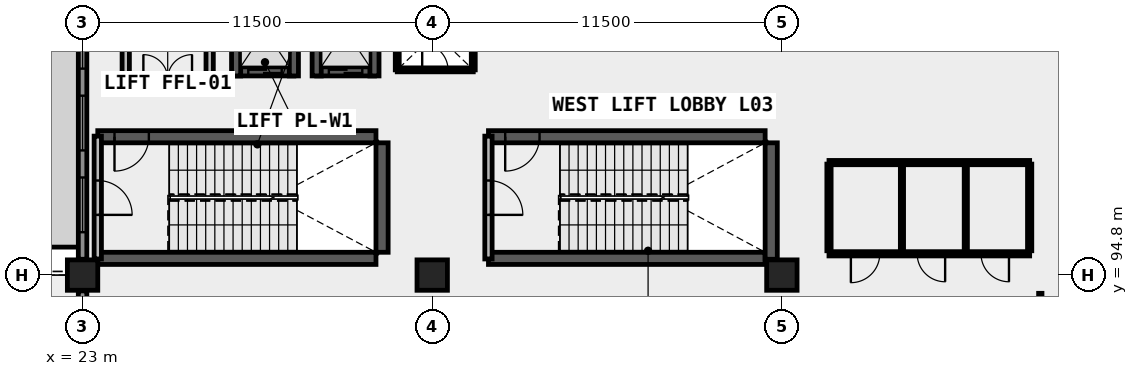
"""IFC4 building model, lengths in metres.
Left out: names, types, materials, properties, quantities, classifications, styles, units other than length and angle.
Written with IfcOpenShell. Run it as: python <this file> out.ifc"""

import sys

from ifc_helpers import new_model, si_unit, direction, frame, frame_2d, origin, origin_2d, place, context, subcontext, project, spatial, rectangle, extrude, element, fill, save


model = new_model("IFC4")
c1 = context("Model", 3, precision=1e-05, world=origin(), true_north=direction((0.0, 1.0)))
c2 = subcontext(c1, "Body", "Model", "MODEL_VIEW")
j1 = project(units=[si_unit("LENGTHUNIT", "METRE"), si_unit("PLANEANGLEUNIT", "RADIAN")], contexts=[c1])
p1 = place(None, origin())
s1 = spatial("IfcSite", under=j1, at=p1, CompositionType="ELEMENT")
p2 = place(p1, origin())
s2 = spatial("IfcBuilding", under=s1, at=p2, CompositionType="ELEMENT")
p3 = place(p2, frame((0.0, 0.0, 13.8)))
s3 = spatial("IfcBuildingStorey", under=s2, at=p3, CompositionType="ELEMENT", Elevation=13.8)
for number, where, z_axis, x_axis in (
    (1, (23.0, 94.8, 0.0), (0.0, 0.0, 1.0), (1.0, 0.0, 0.0)),
    (2, (34.5, 94.8, 0.0), (0.0, 0.0, 1.0), (1.0, 0.0, 0.0)),
    (3, (46.0, 94.8, 0.0), (0.0, 0.0, 1.0), (1.0, 0.0, 0.0)),
):
    element("IfcColumn", number, at=place(p3, frame(where, z_axis=z_axis, x_axis=x_axis)), inside=s3, PredefinedType="COLUMN", context=c2, shape_type="SweptSolid", body=[
        extrude(rectangle(XDim=1.0, YDim=1.0, at=origin_2d()), origin(), (0.0, 0.0, 1.0), 4.5),
    ])
p4 = place(p3, frame((28.05, 101.5, 0.0), z_axis=(0.0, 0.0, 1.0), x_axis=(1.0, 0.0, 0.0)))
e4 = element("IfcWall", 4, at=p4, inside=s3, PredefinedType="SHEAR", context=c2, shape_type="SweptSolid", body=[
    extrude(rectangle(XDim=1.9, YDim=0.3, at=frame_2d((0.95, 0.0))), origin(), (0.0, 0.0, 1.0), 4.5),
])
p5 = place(p4, frame((0.4, 0.0, 0.0)))
e5 = element("IfcOpeningElement", 5, at=p5, cuts=e4, PredefinedType="OPENING", context=c2, shape_type="SweptSolid", body=[
    extrude(rectangle(XDim=1.1, YDim=2.15, at=frame_2d((0.55, 1.075))), frame((0.0, 0.16, 0.0), z_axis=(0.0, -1.0, 0.0), x_axis=(1.0, 0.0, 0.0)), (0.0, 0.0, 1.0), 0.32),
])
for number, where, z_axis, x_axis in (
    (6, (28.05, 101.35, 0.0), (0.0, 0.0, 1.0), (0.0, 1.0, 0.0)),
    (7, (29.95, 101.35, 0.0), (0.0, 0.0, 1.0), (0.0, 1.0, 0.0)),
):
    element("IfcWall", number, at=place(p3, frame(where, z_axis=z_axis, x_axis=x_axis)), inside=s3, PredefinedType="SHEAR", context=c2, shape_type="SweptSolid", body=[
        extrude(rectangle(XDim=3.0, YDim=0.3, at=frame_2d((1.5, 0.0))), origin(), (0.0, 0.0, 1.0), 4.5),
    ])
p6 = place(p3, frame((30.7, 101.5, 0.0), z_axis=(0.0, 0.0, 1.0), x_axis=(1.0, 0.0, 0.0)))
e8 = element("IfcWall", 8, at=p6, inside=s3, PredefinedType="SHEAR", context=c2, shape_type="SweptSolid", body=[
    extrude(rectangle(XDim=1.9, YDim=0.3, at=frame_2d((0.95, 0.0))), origin(), (0.0, 0.0, 1.0), 4.5),
])
p7 = place(p6, frame((0.4, 0.0, 0.0)))
e9 = element("IfcOpeningElement", 9, at=p7, cuts=e8, PredefinedType="OPENING", context=c2, shape_type="SweptSolid", body=[
    extrude(rectangle(XDim=1.1, YDim=2.15, at=frame_2d((0.55, 1.075))), frame((0.0, 0.16, 0.0), z_axis=(0.0, -1.0, 0.0), x_axis=(1.0, 0.0, 0.0)), (0.0, 0.0, 1.0), 0.32),
])
for number, where, z_axis, x_axis in (
    (10, (30.7, 101.35, 0.0), (0.0, 0.0, 1.0), (0.0, 1.0, 0.0)),
    (11, (32.6, 101.35, 0.0), (0.0, 0.0, 1.0), (0.0, 1.0, 0.0)),
):
    element("IfcWall", number, at=place(p3, frame(where, z_axis=z_axis, x_axis=x_axis)), inside=s3, PredefinedType="SHEAR", context=c2, shape_type="SweptSolid", body=[
        extrude(rectangle(XDim=3.0, YDim=0.3, at=frame_2d((1.5, 0.0))), origin(), (0.0, 0.0, 1.0), 4.5),
    ])
p8 = place(p3, frame((23.5, 95.35, 0.0), z_axis=(0.0, 0.0, 1.0), x_axis=(1.0, 0.0, 0.0)))
e12 = element("IfcWall", 12, at=p8, inside=s3, PredefinedType="SHEAR", context=c2, shape_type="SweptSolid", body=[
    extrude(rectangle(XDim=9.15, YDim=0.4, at=frame_2d((4.575, 0.0))), origin(), (0.0, 0.0, 1.0), 4.5),
])
p9 = place(p3, frame((23.5, 99.35, 0.0), z_axis=(0.0, 0.0, 1.0), x_axis=(1.0, 0.0, 0.0)))
e13 = element("IfcWall", 13, at=p9, inside=s3, PredefinedType="SHEAR", context=c2, shape_type="SweptSolid", body=[
    extrude(rectangle(XDim=9.15, YDim=0.4, at=frame_2d((4.575, 0.0))), origin(), (0.0, 0.0, 1.0), 4.5),
])
p10 = place(p9, frame((0.55, 0.0, 0.0)))
e14 = element("IfcOpeningElement", 14, at=p10, cuts=e13, PredefinedType="OPENING", context=c2, shape_type="SweptSolid", body=[
    extrude(rectangle(XDim=1.13, YDim=2.15, at=frame_2d((0.565, 1.075))), frame((0.0, 0.21, 0.0), z_axis=(0.0, -1.0, 0.0), x_axis=(1.0, 0.0, 0.0)), (0.0, 0.0, 1.0), 0.42),
])
p11 = place(p3, frame((32.85, 95.55, 0.0), z_axis=(0.0, 0.0, 1.0), x_axis=(0.0, 1.0, 0.0)))
e15 = element("IfcWall", 15, at=p11, inside=s3, PredefinedType="SHEAR", context=c2, shape_type="SweptSolid", body=[
    extrude(rectangle(XDim=3.6, YDim=0.4, at=frame_2d((1.8, 0.0))), origin(), (0.0, 0.0, 1.0), 4.5),
])
p12 = place(p3, frame((36.35, 95.35, 0.0), z_axis=(0.0, 0.0, 1.0), x_axis=(1.0, 0.0, 0.0)))
e16 = element("IfcWall", 16, at=p12, inside=s3, PredefinedType="SHEAR", context=c2, shape_type="SweptSolid", body=[
    extrude(rectangle(XDim=9.1, YDim=0.4, at=frame_2d((4.55, 0.0))), origin(), (0.0, 0.0, 1.0), 4.5),
])
p13 = place(p3, frame((36.35, 99.35, 0.0), z_axis=(0.0, 0.0, 1.0), x_axis=(1.0, 0.0, 0.0)))
e17 = element("IfcWall", 17, at=p13, inside=s3, PredefinedType="SHEAR", context=c2, shape_type="SweptSolid", body=[
    extrude(rectangle(XDim=9.1, YDim=0.4, at=frame_2d((4.55, 0.0))), origin(), (0.0, 0.0, 1.0), 4.5),
])
p14 = place(p13, frame((0.55, 0.0, 0.0)))
e18 = element("IfcOpeningElement", 18, at=p14, cuts=e17, PredefinedType="OPENING", context=c2, shape_type="SweptSolid", body=[
    extrude(rectangle(XDim=1.13, YDim=2.15, at=frame_2d((0.565, 1.075))), frame((0.0, 0.21, 0.0), z_axis=(0.0, -1.0, 0.0), x_axis=(1.0, 0.0, 0.0)), (0.0, 0.0, 1.0), 0.42),
])
p15 = place(p3, frame((45.65, 95.32, 0.0), z_axis=(0.0, 0.0, 1.0), x_axis=(0.0, 1.0, 0.0)))
e19 = element("IfcWall", 19, at=p15, inside=s3, PredefinedType="SHEAR", context=c2, shape_type="SweptSolid", body=[
    extrude(rectangle(XDim=3.83, YDim=0.4, at=frame_2d((1.915, 0.0))), origin(), (0.0, 0.0, 1.0), 4.5),
])
p16 = place(p3, frame((23.0, 86.27, 0.0), z_axis=(0.0, 0.0, 1.0), x_axis=(0.0, 1.0, 0.0)))
e20 = element("IfcWall", 20, at=p16, inside=s3, PredefinedType="SOLIDWALL", context=c2, shape_type="SweptSolid", body=[
    extrude(rectangle(XDim=8.01, YDim=0.28, at=frame_2d((4.005, 0.0))), origin(), (0.0, 0.0, 1.0), 3.45),
])
p17 = place(p16, frame((3.105, 0.0, 0.0)))
e21 = element("IfcOpeningElement", 21, at=p17, cuts=e20, PredefinedType="OPENING", context=c2, shape_type="SweptSolid", body=[
    extrude(rectangle(XDim=1.8, YDim=2.25, at=frame_2d((0.9, 1.125))), frame((0.0, 0.15, 0.0), z_axis=(0.0, -1.0, 0.0), x_axis=(1.0, 0.0, 0.0)), (0.0, 0.0, 1.0), 0.3),
])
p18 = place(p3, frame((23.0, 95.32, 0.0), z_axis=(0.0, 0.0, 1.0), x_axis=(0.0, 1.0, 0.0)))
e22 = element("IfcWall", 22, at=p18, inside=s3, PredefinedType="SOLIDWALL", context=c2, shape_type="SweptSolid", body=[
    extrude(rectangle(XDim=8.96, YDim=0.28, at=frame_2d((4.48, 0.0))), origin(), (0.0, 0.0, 1.0), 3.45),
])
p19 = place(p18, frame((0.89, 0.0, 0.85)))
e23 = element("IfcOpeningElement", 23, at=p19, cuts=e22, PredefinedType="OPENING", context=c2, shape_type="SweptSolid", body=[
    extrude(rectangle(XDim=1.8, YDim=1.95, at=frame_2d((0.9, 0.975))), frame((0.0, 0.15, 0.0), z_axis=(0.0, -1.0, 0.0), x_axis=(1.0, 0.0, 0.0)), (0.0, 0.0, 1.0), 0.3),
])
p20 = place(p18, frame((3.58, 0.0, 0.85)))
e24 = element("IfcOpeningElement", 24, at=p20, cuts=e22, PredefinedType="OPENING", context=c2, shape_type="SweptSolid", body=[
    extrude(rectangle(XDim=1.8, YDim=1.95, at=frame_2d((0.9, 0.975))), frame((0.0, 0.15, 0.0), z_axis=(0.0, -1.0, 0.0), x_axis=(1.0, 0.0, 0.0)), (0.0, 0.0, 1.0), 0.3),
])
p21 = place(p18, frame((6.27, 0.0, 0.85)))
e25 = element("IfcOpeningElement", 25, at=p21, cuts=e22, PredefinedType="OPENING", context=c2, shape_type="SweptSolid", body=[
    extrude(rectangle(XDim=1.8, YDim=1.95, at=frame_2d((0.9, 0.975))), frame((0.0, 0.15, 0.0), z_axis=(0.0, -1.0, 0.0), x_axis=(1.0, 0.0, 0.0)), (0.0, 0.0, 1.0), 0.3),
])
p22 = place(p3, frame((23.5, 95.33, 0.0), z_axis=(0.0, 0.0, 1.0), x_axis=(0.0, 1.0, 0.0)))
e26 = element("IfcWall", 26, at=p22, inside=s3, PredefinedType="SOLIDWALL", context=c2, shape_type="SweptSolid", body=[
    extrude(rectangle(XDim=4.04, YDim=0.24, at=frame_2d((2.02, 0.0))), origin(), (0.0, 0.0, 1.0), 4.22),
])
p23 = place(p22, frame((1.45, 0.0, 0.0)))
e27 = element("IfcOpeningElement", 27, at=p23, cuts=e26, PredefinedType="OPENING", context=c2, shape_type="SweptSolid", body=[
    extrude(rectangle(XDim=1.13, YDim=2.15, at=frame_2d((0.565, 1.075))), frame((0.0, 0.13, 0.0), z_axis=(0.0, -1.0, 0.0), x_axis=(1.0, 0.0, 0.0)), (0.0, 0.0, 1.0), 0.26),
])
p24 = place(p3, frame((36.35, 95.33, 0.0), z_axis=(0.0, 0.0, 1.0), x_axis=(0.0, 1.0, 0.0)))
e28 = element("IfcWall", 28, at=p24, inside=s3, PredefinedType="SOLIDWALL", context=c2, shape_type="SweptSolid", body=[
    extrude(rectangle(XDim=4.04, YDim=0.24, at=frame_2d((2.02, 0.0))), origin(), (0.0, 0.0, 1.0), 4.22),
])
p25 = place(p24, frame((1.45, 0.0, 0.0)))
e29 = element("IfcOpeningElement", 29, at=p25, cuts=e28, PredefinedType="OPENING", context=c2, shape_type="SweptSolid", body=[
    extrude(rectangle(XDim=1.13, YDim=2.15, at=frame_2d((0.565, 1.075))), frame((0.0, 0.13, 0.0), z_axis=(0.0, -1.0, 0.0), x_axis=(1.0, 0.0, 0.0)), (0.0, 0.0, 1.0), 0.26),
])
p26 = place(p3, frame((24.42, 101.25, 0.0), z_axis=(0.0, 0.0, 1.0), x_axis=(1.0, 0.0, 0.0)))
e30 = element("IfcWall", 30, at=p26, inside=s3, PredefinedType="SOLIDWALL", context=c2, shape_type="SweptSolid", body=[
    extrude(rectangle(XDim=2.76, YDim=0.24, at=frame_2d((1.38, 0.0))), origin(), (0.0, 0.0, 1.0), 4.22),
])
p27 = place(p26, frame((0.58, 0.0, 0.0)))
e31 = element("IfcOpeningElement", 31, at=p27, cuts=e30, PredefinedType="OPENING", context=c2, shape_type="SweptSolid", body=[
    extrude(rectangle(XDim=1.6, YDim=2.15, at=frame_2d((0.8, 1.075))), frame((0.0, 0.13, 0.0), z_axis=(0.0, -1.0, 0.0), x_axis=(1.0, 0.0, 0.0)), (0.0, 0.0, 1.0), 0.26),
])
for number, where, z_axis, x_axis in (
    (32, (24.42, 101.25, 0.0), (0.0, 0.0, 1.0), (0.0, 1.0, 0.0)),
    (33, (27.18, 101.25, 0.0), (0.0, 0.0, 1.0), (0.0, 1.0, 0.0)),
):
    element("IfcWall", number, at=place(p3, frame(where, z_axis=z_axis, x_axis=x_axis)), inside=s3, PredefinedType="SOLIDWALL", context=c2, shape_type="SweptSolid", body=[
        extrude(rectangle(XDim=2.6, YDim=0.24, at=frame_2d((1.3, 0.0))), origin(), (0.0, 0.0, 1.0), 4.22),
    ])
p28 = place(p3, frame((33.35, 101.55, 0.0), z_axis=(0.0, 0.0, 1.0), x_axis=(1.0, 0.0, 0.0)))
e34 = element("IfcWall", 34, at=p28, inside=s3, PredefinedType="PLUMBINGWALL", context=c2, shape_type="SweptSolid", body=[
    extrude(rectangle(XDim=2.5, YDim=0.13, at=frame_2d((1.25, 0.0))), origin(), (0.0, 0.0, 1.0), 4.22),
])
p29 = place(p28, frame((0.82, 0.0, 0.0)))
e35 = element("IfcOpeningElement", 35, at=p29, cuts=e34, PredefinedType="OPENING", context=c2, shape_type="SweptSolid", body=[
    extrude(rectangle(XDim=0.85, YDim=2.0, at=frame_2d((0.425, 1.0))), frame((0.0, 0.075, 0.0), z_axis=(0.0, -1.0, 0.0), x_axis=(1.0, 0.0, 0.0)), (0.0, 0.0, 1.0), 0.15),
])
for number, where, z_axis, x_axis in (
    (36, (33.35, 101.55, 0.0), (0.0, 0.0, 1.0), (0.0, 1.0, 0.0)),
    (37, (35.85, 101.55, 0.0), (0.0, 0.0, 1.0), (0.0, 1.0, 0.0)),
):
    element("IfcWall", number, at=place(p3, frame(where, z_axis=z_axis, x_axis=x_axis)), inside=s3, PredefinedType="PLUMBINGWALL", context=c2, shape_type="SweptSolid", body=[
        extrude(rectangle(XDim=2.4, YDim=0.13, at=frame_2d((1.2, 0.0))), origin(), (0.0, 0.0, 1.0), 4.22),
    ])
p30 = place(p3, frame((47.55, 95.5, 0.0), z_axis=(0.0, 0.0, 1.0), x_axis=(1.0, 0.0, 0.0)))
e38 = element("IfcWall", 38, at=p30, inside=s3, PredefinedType="PLUMBINGWALL", context=c2, shape_type="SweptSolid", body=[
    extrude(rectangle(XDim=6.6, YDim=0.14, at=frame_2d((3.3, 0.0))), origin(), (0.0, 0.0, 1.0), 4.22),
])
p31 = place(p30, frame((0.72, 0.0, 0.0)))
e39 = element("IfcOpeningElement", 39, at=p31, cuts=e38, PredefinedType="OPENING", context=c2, shape_type="SweptSolid", body=[
    extrude(rectangle(XDim=0.95, YDim=2.1, at=frame_2d((0.475, 1.05))), frame((0.0, 0.08, 0.0), z_axis=(0.0, -1.0, 0.0), x_axis=(1.0, 0.0, 0.0)), (0.0, 0.0, 1.0), 0.16),
])
p32 = place(p30, frame((2.9, 0.0, 0.0)))
e40 = element("IfcOpeningElement", 40, at=p32, cuts=e38, PredefinedType="OPENING", context=c2, shape_type="SweptSolid", body=[
    extrude(rectangle(XDim=0.92, YDim=2.1, at=frame_2d((0.46, 1.05))), frame((0.0, 0.08, 0.0), z_axis=(0.0, -1.0, 0.0), x_axis=(1.0, 0.0, 0.0)), (0.0, 0.0, 1.0), 0.16),
])
p33 = place(p30, frame((5.0, 0.0, 0.0)))
e41 = element("IfcOpeningElement", 41, at=p33, cuts=e38, PredefinedType="OPENING", context=c2, shape_type="SweptSolid", body=[
    extrude(rectangle(XDim=0.92, YDim=2.1, at=frame_2d((0.46, 1.05))), frame((0.0, 0.08, 0.0), z_axis=(0.0, -1.0, 0.0), x_axis=(1.0, 0.0, 0.0)), (0.0, 0.0, 1.0), 0.16),
])
p34 = place(p3, frame((47.55, 95.6, 0.0), z_axis=(0.0, 0.0, 1.0), x_axis=(0.0, 1.0, 0.0)))
e42 = element("IfcWall", 42, at=p34, inside=s3, PredefinedType="PLUMBINGWALL", context=c2, shape_type="SweptSolid", body=[
    extrude(rectangle(XDim=2.85, YDim=0.14, at=frame_2d((1.425, 0.0))), origin(), (0.0, 0.0, 1.0), 4.22),
])
p35 = place(p3, frame((49.95, 95.6, 0.0), z_axis=(0.0, 0.0, 1.0), x_axis=(0.0, 1.0, 0.0)))
e43 = element("IfcWall", 43, at=p35, inside=s3, PredefinedType="PARTITIONING", context=c2, shape_type="SweptSolid", body=[
    extrude(rectangle(XDim=2.85, YDim=0.105, at=frame_2d((1.425, 0.0))), origin(), (0.0, 0.0, 1.0), 3.7),
])
p36 = place(p3, frame((52.05, 95.6, 0.0), z_axis=(0.0, 0.0, 1.0), x_axis=(0.0, 1.0, 0.0)))
e44 = element("IfcWall", 44, at=p36, inside=s3, PredefinedType="PARTITIONING", context=c2, shape_type="SweptSolid", body=[
    extrude(rectangle(XDim=2.85, YDim=0.105, at=frame_2d((1.425, 0.0))), origin(), (0.0, 0.0, 1.0), 4.22),
])
p37 = place(p3, frame((54.15, 95.6, 0.0), z_axis=(0.0, 0.0, 1.0), x_axis=(0.0, 1.0, 0.0)))
e45 = element("IfcWall", 45, at=p37, inside=s3, PredefinedType="PLUMBINGWALL", context=c2, shape_type="SweptSolid", body=[
    extrude(rectangle(XDim=2.85, YDim=0.14, at=frame_2d((1.425, 0.0))), origin(), (0.0, 0.0, 1.0), 4.22),
])
p38 = place(p3, frame((47.55, 98.5, 0.0), z_axis=(0.0, 0.0, 1.0), x_axis=(1.0, 0.0, 0.0)))
e46 = element("IfcWall", 46, at=p38, inside=s3, PredefinedType="PLUMBINGWALL", context=c2, shape_type="SweptSolid", body=[
    extrude(rectangle(XDim=6.6, YDim=0.14, at=frame_2d((3.3, 0.0))), origin(), (0.0, 0.0, 1.0), 4.22),
])
p39 = place(p3, frame((54.5, 86.4, 0.0), z_axis=(0.0, 0.0, 1.0), x_axis=(0.0, 1.0, 0.0)))
e47 = element("IfcWall", 47, at=p39, inside=s3, PredefinedType="MOVABLE", context=c2, shape_type="SweptSolid", body=[
    extrude(rectangle(XDim=7.8, YDim=0.11, at=frame_2d((3.9, 0.0))), origin(), (0.0, 0.0, 1.0), 4.22),
])
p40 = place(p39, frame((2.8, 0.0, 0.0)))
e48 = element("IfcOpeningElement", 48, at=p40, cuts=e47, PredefinedType="OPENING", context=c2, shape_type="SweptSolid", body=[
    extrude(rectangle(XDim=2.2, YDim=2.4, at=frame_2d((1.1, 1.2))), frame((0.0, 0.065, 0.0), z_axis=(0.0, -1.0, 0.0), x_axis=(1.0, 0.0, 0.0)), (0.0, 0.0, 1.0), 0.13),
])
p41 = place(p19, origin())
e49 = element("IfcWindow", 49, at=p41, inside=s3, PartitioningType="SINGLE_PANEL", PredefinedType="WINDOW", context=c2, shape_type="SweptSolid", body=[
    extrude(rectangle(XDim=1.8, YDim=1.95, at=frame_2d((0.9, 0.975))), frame((0.0, 0.03, 0.0), z_axis=(0.0, -1.0, 0.0), x_axis=(1.0, 0.0, 0.0)), (0.0, 0.0, 1.0), 0.06),
])
fill(e23, e49)
p42 = place(p20, origin())
e50 = element("IfcWindow", 50, at=p42, inside=s3, PartitioningType="SINGLE_PANEL", PredefinedType="WINDOW", context=c2, shape_type="SweptSolid", body=[
    extrude(rectangle(XDim=1.8, YDim=1.95, at=frame_2d((0.9, 0.975))), frame((0.0, 0.03, 0.0), z_axis=(0.0, -1.0, 0.0), x_axis=(1.0, 0.0, 0.0)), (0.0, 0.0, 1.0), 0.06),
])
fill(e24, e50)
p43 = place(p21, origin())
e51 = element("IfcWindow", 51, at=p43, inside=s3, PartitioningType="SINGLE_PANEL", PredefinedType="WINDOW", context=c2, shape_type="SweptSolid", body=[
    extrude(rectangle(XDim=1.8, YDim=1.95, at=frame_2d((0.9, 0.975))), frame((0.0, 0.03, 0.0), z_axis=(0.0, -1.0, 0.0), x_axis=(1.0, 0.0, 0.0)), (0.0, 0.0, 1.0), 0.06),
])
fill(e25, e51)
p44 = place(p5, origin())
e52 = element("IfcDoor", 52, at=p44, inside=s3, OperationType="SLIDING_TO_LEFT", PredefinedType="DOOR", context=c2, shape_type="SweptSolid", body=[
    extrude(rectangle(XDim=1.1, YDim=2.15, at=frame_2d((0.55, 1.075))), frame((0.0, 0.025, 0.0), z_axis=(0.0, -1.0, 0.0), x_axis=(1.0, 0.0, 0.0)), (0.0, 0.0, 1.0), 0.05),
])
fill(e5, e52)
p45 = place(p7, origin())
e53 = element("IfcDoor", 53, at=p45, inside=s3, OperationType="SLIDING_TO_LEFT", PredefinedType="DOOR", context=c2, shape_type="SweptSolid", body=[
    extrude(rectangle(XDim=1.1, YDim=2.15, at=frame_2d((0.55, 1.075))), frame((0.0, 0.025, 0.0), z_axis=(0.0, -1.0, 0.0), x_axis=(1.0, 0.0, 0.0)), (0.0, 0.0, 1.0), 0.05),
])
fill(e9, e53)
p46 = place(p23, frame((0.565, 0.0, 0.0), z_axis=(0.0, 0.0, 1.0), x_axis=(-1.0, 0.0, 0.0)))
e54 = element("IfcDoor", 54, at=p46, inside=s3, OperationType="SINGLE_SWING_LEFT", PredefinedType="DOOR", context=c2, shape_type="SweptSolid", body=[
    extrude(rectangle(XDim=1.13, YDim=2.15, at=frame_2d((0.0, 1.075))), frame((0.0, 0.025, 0.0), z_axis=(0.0, -1.0, 0.0), x_axis=(1.0, 0.0, 0.0)), (0.0, 0.0, 1.0), 0.05),
])
fill(e27, e54)
p47 = place(p10, frame((0.565, 0.0, 0.0), z_axis=(0.0, 0.0, 1.0), x_axis=(-1.0, 0.0, 0.0)))
e55 = element("IfcDoor", 55, at=p47, inside=s3, OperationType="SINGLE_SWING_LEFT", PredefinedType="DOOR", context=c2, shape_type="SweptSolid", body=[
    extrude(rectangle(XDim=1.13, YDim=2.15, at=frame_2d((0.0, 1.075))), frame((0.0, 0.025, 0.0), z_axis=(0.0, -1.0, 0.0), x_axis=(1.0, 0.0, 0.0)), (0.0, 0.0, 1.0), 0.05),
])
fill(e14, e55)
p48 = place(p25, frame((0.565, 0.0, 0.0), z_axis=(0.0, 0.0, 1.0), x_axis=(-1.0, 0.0, 0.0)))
e56 = element("IfcDoor", 56, at=p48, inside=s3, OperationType="SINGLE_SWING_LEFT", PredefinedType="DOOR", context=c2, shape_type="SweptSolid", body=[
    extrude(rectangle(XDim=1.13, YDim=2.15, at=frame_2d((0.0, 1.075))), frame((0.0, 0.025, 0.0), z_axis=(0.0, -1.0, 0.0), x_axis=(1.0, 0.0, 0.0)), (0.0, 0.0, 1.0), 0.05),
])
fill(e29, e56)
p49 = place(p14, frame((0.565, 0.0, 0.0), z_axis=(0.0, 0.0, 1.0), x_axis=(-1.0, 0.0, 0.0)))
e57 = element("IfcDoor", 57, at=p49, inside=s3, OperationType="SINGLE_SWING_LEFT", PredefinedType="DOOR", context=c2, shape_type="SweptSolid", body=[
    extrude(rectangle(XDim=1.13, YDim=2.15, at=frame_2d((0.0, 1.075))), frame((0.0, 0.025, 0.0), z_axis=(0.0, -1.0, 0.0), x_axis=(1.0, 0.0, 0.0)), (0.0, 0.0, 1.0), 0.05),
])
fill(e18, e57)
p50 = place(p27, origin())
e58 = element("IfcDoor", 58, at=p50, inside=s3, OperationType="DOUBLE_DOOR_SINGLE_SWING", PredefinedType="DOOR", context=c2, shape_type="SweptSolid", body=[
    extrude(rectangle(XDim=1.6, YDim=2.15, at=frame_2d((0.8, 1.075))), frame((0.0, 0.025, 0.0), z_axis=(0.0, -1.0, 0.0), x_axis=(1.0, 0.0, 0.0)), (0.0, 0.0, 1.0), 0.05),
])
fill(e31, e58)
p51 = place(p29, origin())
e59 = element("IfcDoor", 59, at=p51, inside=s3, OperationType="SINGLE_SWING_LEFT", PredefinedType="TRAPDOOR", context=c2, shape_type="SweptSolid", body=[
    extrude(rectangle(XDim=0.85, YDim=2.0, at=frame_2d((0.425, 1.0))), frame((0.0, 0.025, 0.0), z_axis=(0.0, -1.0, 0.0), x_axis=(1.0, 0.0, 0.0)), (0.0, 0.0, 1.0), 0.05),
])
fill(e35, e59)
p52 = place(p31, frame((0.475, 0.0, 0.0), z_axis=(0.0, 0.0, 1.0), x_axis=(-1.0, 0.0, 0.0)))
e60 = element("IfcDoor", 60, at=p52, inside=s3, OperationType="SINGLE_SWING_LEFT", PredefinedType="DOOR", context=c2, shape_type="SweptSolid", body=[
    extrude(rectangle(XDim=0.95, YDim=2.1, at=frame_2d((0.0, 1.05))), frame((0.0, 0.025, 0.0), z_axis=(0.0, -1.0, 0.0), x_axis=(1.0, 0.0, 0.0)), (0.0, 0.0, 1.0), 0.05),
])
fill(e39, e60)
p53 = place(p32, origin())
e61 = element("IfcDoor", 61, at=p53, inside=s3, OperationType="SINGLE_SWING_RIGHT", PredefinedType="DOOR", context=c2, shape_type="SweptSolid", body=[
    extrude(rectangle(XDim=0.92, YDim=2.1, at=frame_2d((0.46, 1.05))), frame((0.0, 0.025, 0.0), z_axis=(0.0, -1.0, 0.0), x_axis=(1.0, 0.0, 0.0)), (0.0, 0.0, 1.0), 0.05),
])
fill(e40, e61)
p54 = place(p33, origin())
e62 = element("IfcDoor", 62, at=p54, inside=s3, OperationType="SINGLE_SWING_RIGHT", PredefinedType="DOOR", context=c2, shape_type="SweptSolid", body=[
    extrude(rectangle(XDim=0.92, YDim=2.1, at=frame_2d((0.46, 1.05))), frame((0.0, 0.025, 0.0), z_axis=(0.0, -1.0, 0.0), x_axis=(1.0, 0.0, 0.0)), (0.0, 0.0, 1.0), 0.05),
])
fill(e41, e62)
save(model, sys.argv[1])
